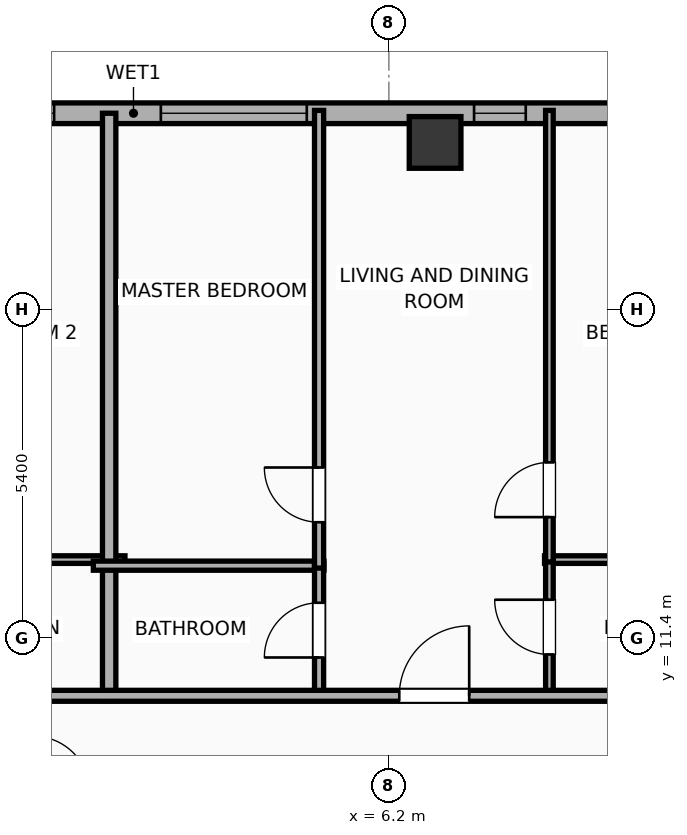
"""IFC4 building model, lengths in metres.
Left out: names, types, materials, properties, quantities, classifications, styles, units other than length and angle.
Written with IfcOpenShell. Run it as: python <this file> out.ifc"""

import sys

from ifc_helpers import new_model, si_unit, direction, frame, frame_2d, origin, origin_2d, place, context, subcontext, project, spatial, rectangle, hollow_rectangle, extrude, element, fill, save


model = new_model("IFC4")
c1 = context("Model", 3, precision=1e-05, world=origin(), true_north=direction((0.0, 1.0)))
c2 = subcontext(c1, "Body", "Model", "MODEL_VIEW")
j1 = project(units=[si_unit("LENGTHUNIT", "METRE"), si_unit("PLANEANGLEUNIT", "RADIAN")], contexts=[c1])
p1 = place(None, origin())
s1 = spatial("IfcSite", under=j1, at=p1, CompositionType="ELEMENT")
p2 = place(p1, origin())
s2 = spatial("IfcBuilding", under=s1, at=p2, CompositionType="ELEMENT")
p3 = place(p2, frame((0.0, 0.0, 250.9)))
s3 = spatial("IfcBuildingStorey", under=s2, at=p3, CompositionType="ELEMENT", Elevation=250.9)
p4 = place(p3, frame((6.96, 19.55, 0.0), z_axis=(0.0, 0.0, 1.0), x_axis=(1.0, 0.0, 0.0)))
e1 = element("IfcColumn", 1, at=p4, inside=s3, PredefinedType="COLUMN", context=c2, shape_type="SweptSolid", body=[
    extrude(hollow_rectangle(XDim=0.85, YDim=0.85, WallThickness=0.028, at=origin_2d()), origin(), (0.0, 0.0, 1.0), 3.865),
])
p5 = place(p3, frame((-22.783, 20.03, 0.0), z_axis=(0.0, 0.0, 1.0), x_axis=(1.0, 0.0, 0.0)))
e2 = element("IfcWall", 2, at=p5, inside=s3, PredefinedType="ELEMENTEDWALL", context=c2, shape_type="SweptSolid", body=[
    extrude(rectangle(XDim=49.566, YDim=0.34, at=frame_2d((24.783, 0.0))), origin(), (0.0, 0.0, 1.0), 2.39),
])
p6 = place(p5, frame((25.233, 0.0, 0.75)))
e3 = element("IfcOpeningElement", 3, at=p6, cuts=e2, PredefinedType="OPENING", context=c2, shape_type="SweptSolid", body=[
    extrude(rectangle(XDim=2.4, YDim=1.45, at=frame_2d((1.2, 0.725))), frame((0.0, 0.18, 0.0), z_axis=(0.0, -1.0, 0.0), x_axis=(1.0, 0.0, 0.0)), (0.0, 0.0, 1.0), 0.36),
])
p7 = place(p5, frame((41.756, 0.0, 0.75)))
e4 = element("IfcOpeningElement", 4, at=p7, cuts=e2, PredefinedType="OPENING", context=c2, shape_type="SweptSolid", body=[
    extrude(rectangle(XDim=2.4, YDim=1.45, at=frame_2d((1.2, 0.725))), frame((0.0, 0.18, 0.0), z_axis=(0.0, -1.0, 0.0), x_axis=(1.0, 0.0, 0.0)), (0.0, 0.0, 1.0), 0.36),
])
p8 = place(p5, frame((1.637, 0.0, 0.55)))
e5 = element("IfcOpeningElement", 5, at=p8, cuts=e2, PredefinedType="OPENING", context=c2, shape_type="SweptSolid", body=[
    extrude(rectangle(XDim=1.2, YDim=1.15, at=frame_2d((0.6, 0.575))), frame((0.0, 0.18, 0.0), z_axis=(0.0, -1.0, 0.0), x_axis=(1.0, 0.0, 0.0)), (0.0, 0.0, 1.0), 0.36),
])
p9 = place(p5, frame((8.019, 0.0, 0.55)))
e6 = element("IfcOpeningElement", 6, at=p9, cuts=e2, PredefinedType="OPENING", context=c2, shape_type="SweptSolid", body=[
    extrude(rectangle(XDim=1.2, YDim=1.15, at=frame_2d((0.6, 0.575))), frame((0.0, 0.18, 0.0), z_axis=(0.0, -1.0, 0.0), x_axis=(1.0, 0.0, 0.0)), (0.0, 0.0, 1.0), 0.36),
])
p10 = place(p5, frame((4.524, 0.0, 0.55)))
e7 = element("IfcOpeningElement", 7, at=p10, cuts=e2, PredefinedType="OPENING", context=c2, shape_type="SweptSolid", body=[
    extrude(rectangle(XDim=1.2, YDim=1.15, at=frame_2d((0.6, 0.575))), frame((0.0, 0.18, 0.0), z_axis=(0.0, -1.0, 0.0), x_axis=(1.0, 0.0, 0.0)), (0.0, 0.0, 1.0), 0.36),
])
p11 = place(p5, frame((11.678, 0.0, 0.55)))
e8 = element("IfcOpeningElement", 8, at=p11, cuts=e2, PredefinedType="OPENING", context=c2, shape_type="SweptSolid", body=[
    extrude(rectangle(XDim=1.2, YDim=1.15, at=frame_2d((0.6, 0.575))), frame((0.0, 0.18, 0.0), z_axis=(0.0, -1.0, 0.0), x_axis=(1.0, 0.0, 0.0)), (0.0, 0.0, 1.0), 0.36),
])
p12 = place(p5, frame((17.993, 0.0, 0.55)))
e9 = element("IfcOpeningElement", 9, at=p12, cuts=e2, PredefinedType="OPENING", context=c2, shape_type="SweptSolid", body=[
    extrude(rectangle(XDim=1.2, YDim=1.15, at=frame_2d((0.6, 0.575))), frame((0.0, 0.18, 0.0), z_axis=(0.0, -1.0, 0.0), x_axis=(1.0, 0.0, 0.0)), (0.0, 0.0, 1.0), 0.36),
])
p13 = place(p5, frame((15.138, 0.0, 0.55)))
e10 = element("IfcOpeningElement", 10, at=p13, cuts=e2, PredefinedType="OPENING", context=c2, shape_type="SweptSolid", body=[
    extrude(rectangle(XDim=1.2, YDim=1.15, at=frame_2d((0.6, 0.575))), frame((0.0, 0.18, 0.0), z_axis=(0.0, -1.0, 0.0), x_axis=(1.0, 0.0, 0.0)), (0.0, 0.0, 1.0), 0.36),
])
p14 = place(p5, frame((22.278, 0.0, 0.55)))
e11 = element("IfcOpeningElement", 11, at=p14, cuts=e2, PredefinedType="OPENING", context=c2, shape_type="SweptSolid", body=[
    extrude(rectangle(XDim=1.2, YDim=1.15, at=frame_2d((0.6, 0.575))), frame((0.0, 0.18, 0.0), z_axis=(0.0, -1.0, 0.0), x_axis=(1.0, 0.0, 0.0)), (0.0, 0.0, 1.0), 0.36),
])
p15 = place(p5, frame((30.384, 0.0, 0.55)))
e12 = element("IfcOpeningElement", 12, at=p15, cuts=e2, PredefinedType="OPENING", context=c2, shape_type="SweptSolid", body=[
    extrude(rectangle(XDim=0.85, YDim=1.15, at=frame_2d((0.425, 0.575))), frame((0.0, 0.18, 0.0), z_axis=(0.0, -1.0, 0.0), x_axis=(1.0, 0.0, 0.0)), (0.0, 0.0, 1.0), 0.36),
])
p16 = place(p5, frame((32.603, 0.0, 0.55)))
e13 = element("IfcOpeningElement", 13, at=p16, cuts=e2, PredefinedType="OPENING", context=c2, shape_type="SweptSolid", body=[
    extrude(rectangle(XDim=1.2, YDim=1.15, at=frame_2d((0.6, 0.575))), frame((0.0, 0.18, 0.0), z_axis=(0.0, -1.0, 0.0), x_axis=(1.0, 0.0, 0.0)), (0.0, 0.0, 1.0), 0.36),
])
p17 = place(p5, frame((37.223, 0.0, 0.55)))
e14 = element("IfcOpeningElement", 14, at=p17, cuts=e2, PredefinedType="OPENING", context=c2, shape_type="SweptSolid", body=[
    extrude(rectangle(XDim=1.2, YDim=1.15, at=frame_2d((0.6, 0.575))), frame((0.0, 0.18, 0.0), z_axis=(0.0, -1.0, 0.0), x_axis=(1.0, 0.0, 0.0)), (0.0, 0.0, 1.0), 0.36),
])
p18 = place(p5, frame((45.099, 0.0, 0.55)))
e15 = element("IfcOpeningElement", 15, at=p18, cuts=e2, PredefinedType="OPENING", context=c2, shape_type="SweptSolid", body=[
    extrude(rectangle(XDim=1.2, YDim=1.15, at=frame_2d((0.6, 0.575))), frame((0.0, 0.18, 0.0), z_axis=(0.0, -1.0, 0.0), x_axis=(1.0, 0.0, 0.0)), (0.0, 0.0, 1.0), 0.36),
])
p19 = place(p5, frame((47.209, 0.0, 0.55)))
e16 = element("IfcOpeningElement", 16, at=p19, cuts=e2, PredefinedType="OPENING", context=c2, shape_type="SweptSolid", body=[
    extrude(rectangle(XDim=1.2, YDim=1.15, at=frame_2d((0.6, 0.575))), frame((0.0, 0.18, 0.0), z_axis=(0.0, -1.0, 0.0), x_axis=(1.0, 0.0, 0.0)), (0.0, 0.0, 1.0), 0.36),
])
p20 = place(p3, frame((-1.49, 12.69, 0.0), z_axis=(0.0, 0.0, 1.0), x_axis=(1.0, 0.0, 0.0)))
e17 = element("IfcWall", 17, at=p20, inside=s3, PredefinedType="PARTITIONING", context=c2, shape_type="SweptSolid", body=[
    extrude(rectangle(XDim=3.35, YDim=0.125, at=frame_2d((1.675, 0.0))), origin(), (0.0, 0.0, 1.0), 3.5),
])
p21 = place(p3, frame((1.6, 10.37, 0.0), z_axis=(0.0, 0.0, 1.0), x_axis=(0.0, 1.0, 0.0)))
e18 = element("IfcWall", 18, at=p21, inside=s3, PredefinedType="PARTITIONING", context=c2, shape_type="SweptSolid", body=[
    extrude(rectangle(XDim=9.66, YDim=0.22, at=frame_2d((4.83, 0.0))), origin(), (0.0, 0.0, 1.0), 3.5),
])
p22 = place(p3, frame((1.34, 12.59, 0.0), z_axis=(0.0, 0.0, 1.0), x_axis=(1.0, 0.0, 0.0)))
e19 = element("IfcWall", 19, at=p22, inside=s3, PredefinedType="PLUMBINGWALL", context=c2, shape_type="SweptSolid", body=[
    extrude(rectangle(XDim=3.792, YDim=0.15, at=frame_2d((1.896, 0.0))), origin(), (0.0, 0.0, 1.0), 3.5),
])
p23 = place(p3, frame((8.76, 12.69, 0.0), z_axis=(0.0, 0.0, 1.0), x_axis=(1.0, 0.0, 0.0)))
e20 = element("IfcWall", 20, at=p23, inside=s3, PredefinedType="PARTITIONING", context=c2, shape_type="SweptSolid", body=[
    extrude(rectangle(XDim=3.5, YDim=0.125, at=frame_2d((1.75, 0.0))), origin(), (0.0, 0.0, 1.0), 3.5),
])
p24 = place(p3, frame((5.052, 10.43, 0.0), z_axis=(0.0, 0.0, 1.0), x_axis=(0.0, 1.0, 0.0)))
e21 = element("IfcWall", 21, at=p24, inside=s3, PredefinedType="PLUMBINGWALL", context=c2, shape_type="SweptSolid", body=[
    extrude(rectangle(XDim=2.2, YDim=0.15, at=frame_2d((1.1, 0.0))), origin(), (0.0, 0.0, 1.0), 2.39),
])
p25 = place(p24, frame((0.65, 0.0, 0.0)))
e22 = element("IfcOpeningElement", 22, at=p25, cuts=e21, PredefinedType="OPENING", context=c2, shape_type="SweptSolid", body=[
    extrude(rectangle(XDim=0.9, YDim=2.05, at=frame_2d((0.45, 1.025))), frame((0.0, 0.085, 0.0), z_axis=(0.0, -1.0, 0.0), x_axis=(1.0, 0.0, 0.0)), (0.0, 0.0, 1.0), 0.17),
])
p26 = place(p3, frame((5.052, 12.55, 0.0), z_axis=(0.0, 0.0, 1.0), x_axis=(0.0, 1.0, 0.0)))
e23 = element("IfcWall", 23, at=p26, inside=s3, PredefinedType="PLUMBINGWALL", context=c2, shape_type="SweptSolid", body=[
    extrude(rectangle(XDim=7.527, YDim=0.15, at=frame_2d((3.763, 0.0))), origin(), (0.0, 0.0, 1.0), 2.39),
])
p27 = place(p26, frame((0.754, 0.0, 0.0)))
e24 = element("IfcOpeningElement", 24, at=p27, cuts=e23, PredefinedType="OPENING", context=c2, shape_type="SweptSolid", body=[
    extrude(rectangle(XDim=0.9, YDim=2.05, at=frame_2d((0.45, 1.025))), frame((0.0, 0.085, 0.0), z_axis=(0.0, -1.0, 0.0), x_axis=(1.0, 0.0, 0.0)), (0.0, 0.0, 1.0), 0.17),
])
p28 = place(p3, frame((8.84, 10.43, 0.0), z_axis=(0.0, 0.0, 1.0), x_axis=(0.0, 1.0, 0.0)))
e25 = element("IfcWall", 25, at=p28, inside=s3, PredefinedType="PARTITIONING", context=c2, shape_type="SweptSolid", body=[
    extrude(rectangle(XDim=2.3, YDim=0.125, at=frame_2d((1.15, 0.0))), origin(), (0.0, 0.0, 1.0), 3.5),
])
p29 = place(p28, frame((0.7, 0.0, 0.0)))
e26 = element("IfcOpeningElement", 26, at=p29, cuts=e25, PredefinedType="OPENING", context=c2, shape_type="SweptSolid", body=[
    extrude(rectangle(XDim=0.9, YDim=2.05, at=frame_2d((0.45, 1.025))), frame((0.0, 0.073, 0.0), z_axis=(0.0, -1.0, 0.0), x_axis=(1.0, 0.0, 0.0)), (0.0, 0.0, 1.0), 0.145),
])
p30 = place(p3, frame((8.84, 12.65, 0.0), z_axis=(0.0, 0.0, 1.0), x_axis=(0.0, 1.0, 0.0)))
e27 = element("IfcWall", 27, at=p30, inside=s3, PredefinedType="PARTITIONING", context=c2, shape_type="SweptSolid", body=[
    extrude(rectangle(XDim=7.427, YDim=0.125, at=frame_2d((3.713, 0.0))), origin(), (0.0, 0.0, 1.0), 3.5),
])
p31 = place(p30, frame((0.738, 0.0, 0.0)))
e28 = element("IfcOpeningElement", 28, at=p31, cuts=e27, PredefinedType="OPENING", context=c2, shape_type="SweptSolid", body=[
    extrude(rectangle(XDim=0.9, YDim=2.05, at=frame_2d((0.45, 1.025))), frame((0.0, 0.073, 0.0), z_axis=(0.0, -1.0, 0.0), x_axis=(1.0, 0.0, 0.0)), (0.0, 0.0, 1.0), 0.145),
])
p32 = place(p3, frame((-26.23, 10.45, 0.0), z_axis=(0.0, 0.0, 1.0), x_axis=(1.0, 0.0, 0.0)))
e29 = element("IfcWall", 29, at=p32, inside=s3, PredefinedType="PARTITIONING", context=c2, shape_type="SweptSolid", body=[
    extrude(rectangle(XDim=56.46, YDim=0.18, at=frame_2d((28.23, 0.0))), origin(), (0.0, 0.0, 1.0), 3.5),
])
p33 = place(p32, frame((3.072, 0.0, 0.0)))
e30 = element("IfcOpeningElement", 30, at=p33, cuts=e29, PredefinedType="OPENING", context=c2, shape_type="SweptSolid", body=[
    extrude(rectangle(XDim=1.15, YDim=2.05, at=frame_2d((0.575, 1.025))), frame((0.0, 0.1, 0.0), z_axis=(0.0, -1.0, 0.0), x_axis=(1.0, 0.0, 0.0)), (0.0, 0.0, 1.0), 0.2),
])
p34 = place(p32, frame((12.146, 0.0, 0.0)))
e31 = element("IfcOpeningElement", 31, at=p34, cuts=e29, PredefinedType="OPENING", context=c2, shape_type="SweptSolid", body=[
    extrude(rectangle(XDim=1.15, YDim=2.05, at=frame_2d((0.575, 1.025))), frame((0.0, 0.1, 0.0), z_axis=(0.0, -1.0, 0.0), x_axis=(1.0, 0.0, 0.0)), (0.0, 0.0, 1.0), 0.2),
])
p35 = place(p32, frame((22.302, 0.0, 0.0)))
e32 = element("IfcOpeningElement", 32, at=p35, cuts=e29, PredefinedType="OPENING", context=c2, shape_type="SweptSolid", body=[
    extrude(rectangle(XDim=1.15, YDim=2.05, at=frame_2d((0.575, 1.025))), frame((0.0, 0.1, 0.0), z_axis=(0.0, -1.0, 0.0), x_axis=(1.0, 0.0, 0.0)), (0.0, 0.0, 1.0), 0.2),
])
p36 = place(p32, frame((32.601, 0.0, 0.0)))
e33 = element("IfcOpeningElement", 33, at=p36, cuts=e29, PredefinedType="OPENING", context=c2, shape_type="SweptSolid", body=[
    extrude(rectangle(XDim=1.15, YDim=2.05, at=frame_2d((0.575, 1.025))), frame((0.0, 0.1, 0.0), z_axis=(0.0, -1.0, 0.0), x_axis=(1.0, 0.0, 0.0)), (0.0, 0.0, 1.0), 0.2),
])
p37 = place(p32, frame((40.941, 0.0, 0.0)))
e34 = element("IfcOpeningElement", 34, at=p37, cuts=e29, PredefinedType="OPENING", context=c2, shape_type="SweptSolid", body=[
    extrude(rectangle(XDim=0.9, YDim=2.05, at=frame_2d((0.45, 1.025))), frame((0.0, 0.1, 0.0), z_axis=(0.0, -1.0, 0.0), x_axis=(1.0, 0.0, 0.0)), (0.0, 0.0, 1.0), 0.2),
])
p38 = place(p32, frame((45.559, 0.0, 0.0)))
e35 = element("IfcOpeningElement", 35, at=p38, cuts=e29, PredefinedType="OPENING", context=c2, shape_type="SweptSolid", body=[
    extrude(rectangle(XDim=1.15, YDim=2.05, at=frame_2d((0.575, 1.025))), frame((0.0, 0.1, 0.0), z_axis=(0.0, -1.0, 0.0), x_axis=(1.0, 0.0, 0.0)), (0.0, 0.0, 1.0), 0.2),
])
p39 = place(p32, frame((53.125, 0.0, 0.0)))
e36 = element("IfcOpeningElement", 36, at=p39, cuts=e29, PredefinedType="OPENING", context=c2, shape_type="SweptSolid", body=[
    extrude(rectangle(XDim=0.9, YDim=2.05, at=frame_2d((0.45, 1.025))), frame((0.0, 0.1, 0.0), z_axis=(0.0, -1.0, 0.0), x_axis=(1.0, 0.0, 0.0)), (0.0, 0.0, 1.0), 0.2),
])
p40 = place(p6, origin())
e37 = element("IfcWindow", 37, at=p40, inside=s3, PartitioningType="SINGLE_PANEL", PredefinedType="WINDOW", context=c2, shape_type="SweptSolid", body=[
    extrude(rectangle(XDim=2.4, YDim=1.45, at=frame_2d((1.2, 0.725))), frame((0.0, 0.03, 0.0), z_axis=(0.0, -1.0, 0.0), x_axis=(1.0, 0.0, 0.0)), (0.0, 0.0, 1.0), 0.06),
])
fill(e3, e37)
p41 = place(p14, origin())
e38 = element("IfcWindow", 38, at=p41, inside=s3, PartitioningType="SINGLE_PANEL", PredefinedType="WINDOW", context=c2, shape_type="SweptSolid", body=[
    extrude(rectangle(XDim=1.2, YDim=1.15, at=frame_2d((0.6, 0.575))), frame((0.0, 0.03, 0.0), z_axis=(0.0, -1.0, 0.0), x_axis=(1.0, 0.0, 0.0)), (0.0, 0.0, 1.0), 0.06),
])
fill(e11, e38)
p42 = place(p15, origin())
e39 = element("IfcWindow", 39, at=p42, inside=s3, PartitioningType="SINGLE_PANEL", PredefinedType="WINDOW", context=c2, shape_type="SweptSolid", body=[
    extrude(rectangle(XDim=0.85, YDim=1.15, at=frame_2d((0.425, 0.575))), frame((0.0, 0.03, 0.0), z_axis=(0.0, -1.0, 0.0), x_axis=(1.0, 0.0, 0.0)), (0.0, 0.0, 1.0), 0.06),
])
fill(e12, e39)
p43 = place(p25, origin())
e40 = element("IfcDoor", 40, at=p43, inside=s3, OperationType="SINGLE_SWING_LEFT", PredefinedType="DOOR", context=c2, shape_type="SweptSolid", body=[
    extrude(rectangle(XDim=0.9, YDim=2.05, at=frame_2d((0.45, 1.025))), frame((0.0, 0.025, 0.0), z_axis=(0.0, -1.0, 0.0), x_axis=(1.0, 0.0, 0.0)), (0.0, 0.0, 1.0), 0.05),
])
fill(e22, e40)
p44 = place(p27, origin())
e41 = element("IfcDoor", 41, at=p44, inside=s3, OperationType="SINGLE_SWING_RIGHT", PredefinedType="DOOR", context=c2, shape_type="SweptSolid", body=[
    extrude(rectangle(XDim=0.9, YDim=2.05, at=frame_2d((0.45, 1.025))), frame((0.0, 0.025, 0.0), z_axis=(0.0, -1.0, 0.0), x_axis=(1.0, 0.0, 0.0)), (0.0, 0.0, 1.0), 0.05),
])
fill(e24, e41)
p45 = place(p29, origin())
e42 = element("IfcDoor", 42, at=p45, inside=s3, OperationType="SINGLE_SWING_RIGHT", PredefinedType="DOOR", context=c2, shape_type="SweptSolid", body=[
    extrude(rectangle(XDim=0.9, YDim=2.05, at=frame_2d((0.45, 1.025))), frame((0.0, 0.025, 0.0), z_axis=(0.0, -1.0, 0.0), x_axis=(1.0, 0.0, 0.0)), (0.0, 0.0, 1.0), 0.05),
])
fill(e26, e42)
p46 = place(p31, origin())
e43 = element("IfcDoor", 43, at=p46, inside=s3, OperationType="SINGLE_SWING_LEFT", PredefinedType="DOOR", context=c2, shape_type="SweptSolid", body=[
    extrude(rectangle(XDim=0.9, YDim=2.05, at=frame_2d((0.45, 1.025))), frame((0.0, 0.025, 0.0), z_axis=(0.0, -1.0, 0.0), x_axis=(1.0, 0.0, 0.0)), (0.0, 0.0, 1.0), 0.05),
])
fill(e28, e43)
p47 = place(p36, origin())
e44 = element("IfcDoor", 44, at=p47, inside=s3, OperationType="SINGLE_SWING_RIGHT", PredefinedType="DOOR", context=c2, shape_type="SweptSolid", body=[
    extrude(rectangle(XDim=1.15, YDim=2.05, at=frame_2d((0.575, 1.025))), frame((0.0, 0.025, 0.0), z_axis=(0.0, -1.0, 0.0), x_axis=(1.0, 0.0, 0.0)), (0.0, 0.0, 1.0), 0.05),
])
fill(e33, e44)
save(model, sys.argv[1])
